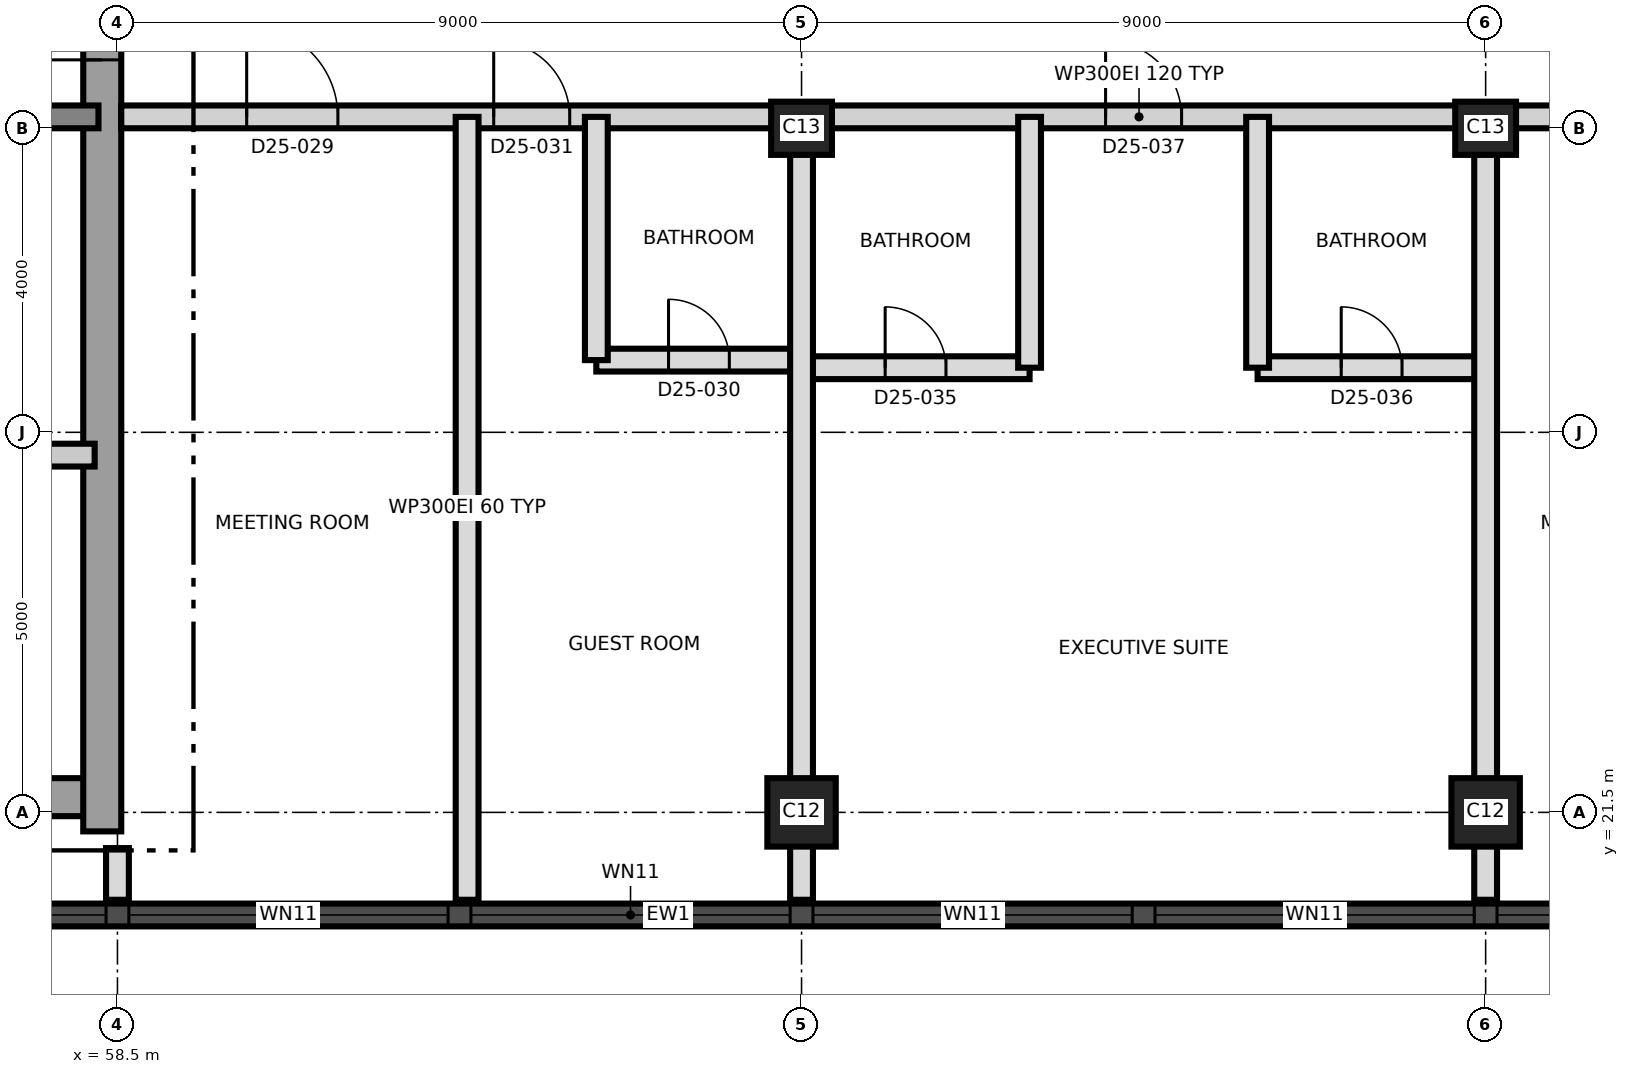
"""IFC4 building model, lengths in metres.
Left out: names, types, materials, properties, quantities, classifications, styles, units other than length and angle.
Written with IfcOpenShell. Run it as: python <this file> out.ifc"""

import sys

from ifc_helpers import new_model, si_unit, direction, frame, frame_2d, origin, origin_2d, place, context, subcontext, project, spatial, rectangle, extrude, element, fill, save


model = new_model("IFC4")
c1 = context("Model", 3, precision=1e-05, world=origin(), true_north=direction((0.0, 1.0)))
c2 = subcontext(c1, "Body", "Model", "MODEL_VIEW")
j1 = project(units=[si_unit("LENGTHUNIT", "METRE"), si_unit("PLANEANGLEUNIT", "RADIAN")], contexts=[c1])
p1 = place(None, origin())
s1 = spatial("IfcSite", under=j1, at=p1, CompositionType="ELEMENT")
p2 = place(p1, origin())
s2 = spatial("IfcBuilding", under=s1, at=p2, CompositionType="ELEMENT")
p3 = place(p2, frame((0.0, 0.0, 225.4)))
s3 = spatial("IfcBuildingStorey", under=s2, at=p3, CompositionType="ELEMENT", Elevation=225.4)
p4 = place(p3, frame((31.25, 21.7, 0.0), z_axis=(0.0, 0.0, 1.0), x_axis=(1.0, 0.0, 0.0)))
e1 = element("IfcWall", 1, at=p4, inside=s3, PredefinedType="SHEAR", context=c2, shape_type="SweptSolid", body=[
    extrude(rectangle(XDim=27.0, YDim=0.5, at=frame_2d((13.5, 0.0))), origin(), (0.0, 0.0, 1.0), 3.7),
])
p5 = place(p3, frame((58.3, 21.25, 0.0), z_axis=(0.0, 0.0, 1.0), x_axis=(0.0, 1.0, 0.0)))
e2 = element("IfcWall", 2, at=p5, inside=s3, PredefinedType="SHEAR", context=c2, shape_type="SweptSolid", body=[
    extrude(rectangle(XDim=18.5, YDim=0.5, at=frame_2d((9.25, 0.0))), origin(), (0.0, 0.0, 1.0), 3.7),
])
p6 = place(p5, frame((10.15, 0.0, 0.0)))
e3 = element("IfcOpeningElement", 3, at=p6, cuts=e2, PredefinedType="OPENING", context=c2, shape_type="SweptSolid", body=[
    extrude(rectangle(XDim=1.2, YDim=2.1, at=frame_2d((0.6, 1.05))), frame((0.0, 0.26, 0.0), z_axis=(0.0, -1.0, 0.0), x_axis=(1.0, 0.0, 0.0)), (0.0, 0.0, 1.0), 0.52),
])
p7 = place(p3, frame((31.75, 30.65, 0.0), z_axis=(0.0, 0.0, 1.0), x_axis=(1.0, 0.0, 0.0)))
e4 = element("IfcWall", 4, at=p7, inside=s3, PredefinedType="SHEAR", context=c2, shape_type="SweptSolid", body=[
    extrude(rectangle(XDim=26.5, YDim=0.3, at=frame_2d((13.25, 0.0))), origin(), (0.0, 0.0, 1.0), 3.7),
])
p8 = place(p7, frame((24.75, 0.0, 0.0)))
e5 = element("IfcOpeningElement", 5, at=p8, cuts=e4, PredefinedType="OPENING", context=c2, shape_type="SweptSolid", body=[
    extrude(rectangle(XDim=1.0, YDim=2.1, at=frame_2d((0.5, 1.05))), frame((0.0, 0.16, 0.0), z_axis=(0.0, -1.0, 0.0), x_axis=(1.0, 0.0, 0.0)), (0.0, 0.0, 1.0), 0.32),
])
p9 = place(p7, frame((4.05, 0.0, 0.0)))
e6 = element("IfcOpeningElement", 6, at=p9, cuts=e4, PredefinedType="OPENING", context=c2, shape_type="SweptSolid", body=[
    extrude(rectangle(XDim=1.0, YDim=2.1, at=frame_2d((0.5, 1.05))), frame((0.0, 0.16, 0.0), z_axis=(0.0, -1.0, 0.0), x_axis=(1.0, 0.0, 0.0)), (0.0, 0.0, 1.0), 0.32),
])
for number, where, z_axis, x_axis in (
    (7, (67.5, 21.5, 0.0), (0.0, 0.0, 1.0), (1.0, 0.0, 0.0)),
    (8, (76.5, 21.5, 0.0), (0.0, 0.0, 1.0), (1.0, 0.0, 0.0)),
):
    element("IfcColumn", number, at=place(p3, frame(where, z_axis=z_axis, x_axis=x_axis)), inside=s3, PredefinedType="COLUMN", context=c2, shape_type="SweptSolid", body=[
        extrude(rectangle(XDim=0.9, YDim=0.9, at=origin_2d()), origin(), (0.0, 0.0, 1.0), 3.7),
    ])
for number, where, z_axis, x_axis in (
    (9, (67.5, 30.5, 0.0), (0.0, 0.0, 1.0), (1.0, 0.0, 0.0)),
    (10, (76.5, 30.5, 0.0), (0.0, 0.0, 1.0), (1.0, 0.0, 0.0)),
):
    element("IfcColumn", number, at=place(p3, frame(where, z_axis=z_axis, x_axis=x_axis)), inside=s3, PredefinedType="COLUMN", context=c2, shape_type="SweptSolid", body=[
        extrude(rectangle(XDim=0.8, YDim=0.7, at=origin_2d()), origin(), (0.0, 0.0, 1.0), 3.7),
    ])
p10 = place(p3, frame((44.011, 20.15, 0.0), z_axis=(0.0, 0.0, 1.0), x_axis=(1.0, 0.0, 0.0)))
e11 = element("IfcWall", 11, at=p10, inside=s3, PredefinedType="SOLIDWALL", context=c2, shape_type="SweptSolid", body=[
    extrude(rectangle(XDim=43.476, YDim=0.3, at=frame_2d((21.738, 0.0))), origin(), (0.0, 0.0, 1.0), 3.4),
])
p11 = place(p10, frame((1.845, 0.0, 0.3)))
e12 = element("IfcOpeningElement", 12, at=p11, cuts=e11, PredefinedType="OPENING", context=c2, shape_type="SweptSolid", body=[
    extrude(rectangle(XDim=1.8, YDim=2.4, at=frame_2d((0.9, 1.2))), frame((0.0, 0.16, 0.0), z_axis=(0.0, -1.0, 0.0), x_axis=(1.0, 0.0, 0.0)), (0.0, 0.0, 1.0), 0.32),
])
p12 = place(p10, frame((5.639, 0.0, 0.9)))
e13 = element("IfcOpeningElement", 13, at=p12, cuts=e11, PredefinedType="OPENING", context=c2, shape_type="SweptSolid", body=[
    extrude(rectangle(XDim=4.2, YDim=1.5, at=frame_2d((2.1, 0.75))), frame((0.0, 0.16, 0.0), z_axis=(0.0, -1.0, 0.0), x_axis=(1.0, 0.0, 0.0)), (0.0, 0.0, 1.0), 0.32),
])
p13 = place(p10, frame((10.139, 0.0, 0.9)))
e14 = element("IfcOpeningElement", 14, at=p13, cuts=e11, PredefinedType="OPENING", context=c2, shape_type="SweptSolid", body=[
    extrude(rectangle(XDim=4.2, YDim=1.5, at=frame_2d((2.1, 0.75))), frame((0.0, 0.16, 0.0), z_axis=(0.0, -1.0, 0.0), x_axis=(1.0, 0.0, 0.0)), (0.0, 0.0, 1.0), 0.32),
])
p14 = place(p10, frame((14.639, 0.0, 0.9)))
e15 = element("IfcOpeningElement", 15, at=p14, cuts=e11, PredefinedType="OPENING", context=c2, shape_type="SweptSolid", body=[
    extrude(rectangle(XDim=4.2, YDim=1.5, at=frame_2d((2.1, 0.75))), frame((0.0, 0.16, 0.0), z_axis=(0.0, -1.0, 0.0), x_axis=(1.0, 0.0, 0.0)), (0.0, 0.0, 1.0), 0.32),
])
p15 = place(p10, frame((19.139, 0.0, 0.9)))
e16 = element("IfcOpeningElement", 16, at=p15, cuts=e11, PredefinedType="OPENING", context=c2, shape_type="SweptSolid", body=[
    extrude(rectangle(XDim=4.2, YDim=1.5, at=frame_2d((2.1, 0.75))), frame((0.0, 0.16, 0.0), z_axis=(0.0, -1.0, 0.0), x_axis=(1.0, 0.0, 0.0)), (0.0, 0.0, 1.0), 0.32),
])
p16 = place(p10, frame((23.639, 0.0, 0.9)))
e17 = element("IfcOpeningElement", 17, at=p16, cuts=e11, PredefinedType="OPENING", context=c2, shape_type="SweptSolid", body=[
    extrude(rectangle(XDim=4.2, YDim=1.5, at=frame_2d((2.1, 0.75))), frame((0.0, 0.16, 0.0), z_axis=(0.0, -1.0, 0.0), x_axis=(1.0, 0.0, 0.0)), (0.0, 0.0, 1.0), 0.32),
])
p17 = place(p10, frame((28.139, 0.0, 0.9)))
e18 = element("IfcOpeningElement", 18, at=p17, cuts=e11, PredefinedType="OPENING", context=c2, shape_type="SweptSolid", body=[
    extrude(rectangle(XDim=4.2, YDim=1.5, at=frame_2d((2.1, 0.75))), frame((0.0, 0.16, 0.0), z_axis=(0.0, -1.0, 0.0), x_axis=(1.0, 0.0, 0.0)), (0.0, 0.0, 1.0), 0.32),
])
p18 = place(p10, frame((32.639, 0.0, 0.9)))
e19 = element("IfcOpeningElement", 19, at=p18, cuts=e11, PredefinedType="OPENING", context=c2, shape_type="SweptSolid", body=[
    extrude(rectangle(XDim=4.2, YDim=1.5, at=frame_2d((2.1, 0.75))), frame((0.0, 0.16, 0.0), z_axis=(0.0, -1.0, 0.0), x_axis=(1.0, 0.0, 0.0)), (0.0, 0.0, 1.0), 0.32),
])
p19 = place(p10, frame((37.139, 0.0, 0.9)))
e20 = element("IfcOpeningElement", 20, at=p19, cuts=e11, PredefinedType="OPENING", context=c2, shape_type="SweptSolid", body=[
    extrude(rectangle(XDim=4.2, YDim=1.5, at=frame_2d((2.1, 0.75))), frame((0.0, 0.16, 0.0), z_axis=(0.0, -1.0, 0.0), x_axis=(1.0, 0.0, 0.0)), (0.0, 0.0, 1.0), 0.32),
])
p20 = place(p3, frame((55.8, 26.2, 0.0), z_axis=(0.0, 0.0, 1.0), x_axis=(1.0, 0.0, 0.0)))
e21 = element("IfcWall", 21, at=p20, inside=s3, PredefinedType="PARTITIONING", context=c2, shape_type="SweptSolid", body=[
    extrude(rectangle(XDim=2.4, YDim=0.3, at=frame_2d((1.2, 0.0))), origin(), (0.0, 0.0, 1.0), 3.4),
])
p21 = place(p20, frame((0.75, 0.0, 0.0)))
e22 = element("IfcOpeningElement", 22, at=p21, cuts=e21, PredefinedType="OPENING", context=c2, shape_type="SweptSolid", body=[
    extrude(rectangle(XDim=0.9, YDim=2.1, at=frame_2d((0.45, 1.05))), frame((0.0, 0.16, 0.0), z_axis=(0.0, -1.0, 0.0), x_axis=(1.0, 0.0, 0.0)), (0.0, 0.0, 1.0), 0.32),
])
p22 = place(p3, frame((67.5, 27.35, 0.0), z_axis=(0.0, 0.0, 1.0), x_axis=(1.0, 0.0, 0.0)))
e23 = element("IfcWall", 23, at=p22, inside=s3, PredefinedType="PARTITIONING", context=c2, shape_type="SweptSolid", body=[
    extrude(rectangle(XDim=3.0, YDim=0.3, at=frame_2d((1.5, 0.0))), origin(), (0.0, 0.0, 1.0), 3.4),
])
p23 = place(p22, frame((1.1, 0.0, 0.0)))
e24 = element("IfcOpeningElement", 24, at=p23, cuts=e23, PredefinedType="OPENING", context=c2, shape_type="SweptSolid", body=[
    extrude(rectangle(XDim=0.8, YDim=2.1, at=frame_2d((0.4, 1.05))), frame((0.0, 0.16, 0.0), z_axis=(0.0, -1.0, 0.0), x_axis=(1.0, 0.0, 0.0)), (0.0, 0.0, 1.0), 0.32),
])
p24 = place(p3, frame((73.5, 27.35, 0.0), z_axis=(0.0, 0.0, 1.0), x_axis=(1.0, 0.0, 0.0)))
e25 = element("IfcWall", 25, at=p24, inside=s3, PredefinedType="PARTITIONING", context=c2, shape_type="SweptSolid", body=[
    extrude(rectangle(XDim=3.0, YDim=0.3, at=frame_2d((1.5, 0.0))), origin(), (0.0, 0.0, 1.0), 3.4),
])
p25 = place(p24, frame((1.1, 0.0, 0.0)))
e26 = element("IfcOpeningElement", 26, at=p25, cuts=e25, PredefinedType="OPENING", context=c2, shape_type="SweptSolid", body=[
    extrude(rectangle(XDim=0.8, YDim=2.1, at=frame_2d((0.4, 1.05))), frame((0.0, 0.16, 0.0), z_axis=(0.0, -1.0, 0.0), x_axis=(1.0, 0.0, 0.0)), (0.0, 0.0, 1.0), 0.32),
])
p26 = place(p3, frame((64.8, 27.45, 0.0), z_axis=(0.0, 0.0, 1.0), x_axis=(1.0, 0.0, 0.0)))
e27 = element("IfcWall", 27, at=p26, inside=s3, PredefinedType="PARTITIONING", context=c2, shape_type="SweptSolid", body=[
    extrude(rectangle(XDim=2.7, YDim=0.3, at=frame_2d((1.35, 0.0))), origin(), (0.0, 0.0, 1.0), 3.4),
])
p27 = place(p26, frame((0.95, 0.0, 0.0)))
e28 = element("IfcOpeningElement", 28, at=p27, cuts=e27, PredefinedType="OPENING", context=c2, shape_type="SweptSolid", body=[
    extrude(rectangle(XDim=0.8, YDim=2.1, at=frame_2d((0.4, 1.05))), frame((0.0, 0.16, 0.0), z_axis=(0.0, -1.0, 0.0), x_axis=(1.0, 0.0, 0.0)), (0.0, 0.0, 1.0), 0.32),
])
p28 = place(p3, frame((58.55, 30.65, 0.0), z_axis=(0.0, 0.0, 1.0), x_axis=(1.0, 0.0, 0.0)))
e29 = element("IfcWall", 29, at=p28, inside=s3, PredefinedType="PARTITIONING", context=c2, shape_type="SweptSolid", body=[
    extrude(rectangle(XDim=26.78, YDim=0.3, at=frame_2d((13.39, 0.0))), origin(), (0.0, 0.0, 1.0), 3.4),
])
p29 = place(p28, frame((1.65, 0.0, 0.0)))
e30 = element("IfcOpeningElement", 30, at=p29, cuts=e29, PredefinedType="OPENING", context=c2, shape_type="SweptSolid", body=[
    extrude(rectangle(XDim=1.2, YDim=2.1, at=frame_2d((0.6, 1.05))), frame((0.0, 0.16, 0.0), z_axis=(0.0, -1.0, 0.0), x_axis=(1.0, 0.0, 0.0)), (0.0, 0.0, 1.0), 0.32),
])
p30 = place(p28, frame((4.9, 0.0, 0.0)))
e31 = element("IfcOpeningElement", 31, at=p30, cuts=e29, PredefinedType="OPENING", context=c2, shape_type="SweptSolid", body=[
    extrude(rectangle(XDim=1.0, YDim=2.1, at=frame_2d((0.5, 1.05))), frame((0.0, 0.16, 0.0), z_axis=(0.0, -1.0, 0.0), x_axis=(1.0, 0.0, 0.0)), (0.0, 0.0, 1.0), 0.32),
])
p31 = place(p28, frame((12.95, 0.0, 0.0)))
e32 = element("IfcOpeningElement", 32, at=p31, cuts=e29, PredefinedType="OPENING", context=c2, shape_type="SweptSolid", body=[
    extrude(rectangle(XDim=1.0, YDim=2.4, at=frame_2d((0.5, 1.2))), frame((0.0, 0.16, 0.0), z_axis=(0.0, -1.0, 0.0), x_axis=(1.0, 0.0, 0.0)), (0.0, 0.0, 1.0), 0.32),
])
p32 = place(p28, frame((19.085, 0.0, 0.0)))
e33 = element("IfcOpeningElement", 33, at=p32, cuts=e29, PredefinedType="OPENING", context=c2, shape_type="SweptSolid", body=[
    extrude(rectangle(XDim=1.2, YDim=2.1, at=frame_2d((0.6, 1.05))), frame((0.0, 0.16, 0.0), z_axis=(0.0, -1.0, 0.0), x_axis=(1.0, 0.0, 0.0)), (0.0, 0.0, 1.0), 0.32),
])
p33 = place(p28, frame((22.335, 0.0, 0.0)))
e34 = element("IfcOpeningElement", 34, at=p33, cuts=e29, PredefinedType="OPENING", context=c2, shape_type="SweptSolid", body=[
    extrude(rectangle(XDim=1.0, YDim=2.1, at=frame_2d((0.5, 1.05))), frame((0.0, 0.16, 0.0), z_axis=(0.0, -1.0, 0.0), x_axis=(1.0, 0.0, 0.0)), (0.0, 0.0, 1.0), 0.32),
])
p34 = place(p3, frame((58.5, 20.35, 0.0), z_axis=(0.0, 0.0, 1.0), x_axis=(0.0, 1.0, 0.0)))
e35 = element("IfcWall", 35, at=p34, inside=s3, PredefinedType="PARTITIONING", context=c2, shape_type="SweptSolid", body=[
    extrude(rectangle(XDim=0.68, YDim=0.3, at=frame_2d((0.34, 0.0))), origin(), (0.0, 0.0, 1.0), 3.4),
])
p35 = place(p3, frame((63.1, 20.35, 0.0), z_axis=(0.0, 0.0, 1.0), x_axis=(0.0, 1.0, 0.0)))
e36 = element("IfcWall", 36, at=p35, inside=s3, PredefinedType="PARTITIONING", context=c2, shape_type="SweptSolid", body=[
    extrude(rectangle(XDim=10.3, YDim=0.3, at=frame_2d((5.15, 0.0))), origin(), (0.0, 0.0, 1.0), 3.4),
])
p36 = place(p3, frame((64.8, 27.45, 0.0), z_axis=(0.0, 0.0, 1.0), x_axis=(0.0, 1.0, 0.0)))
e37 = element("IfcWall", 37, at=p36, inside=s3, PredefinedType="PARTITIONING", context=c2, shape_type="SweptSolid", body=[
    extrude(rectangle(XDim=3.2, YDim=0.3, at=frame_2d((1.6, 0.0))), origin(), (0.0, 0.0, 1.0), 3.4),
])
p37 = place(p3, frame((67.5, 20.35, 0.0), z_axis=(0.0, 0.0, 1.0), x_axis=(0.0, 1.0, 0.0)))
e38 = element("IfcWall", 38, at=p37, inside=s3, PredefinedType="PARTITIONING", context=c2, shape_type="SweptSolid", body=[
    extrude(rectangle(XDim=10.3, YDim=0.3, at=frame_2d((5.15, 0.0))), origin(), (0.0, 0.0, 1.0), 3.4),
])
for number, where, z_axis, x_axis in (
    (39, (70.5, 27.35, 0.0), (0.0, 0.0, 1.0), (0.0, 1.0, 0.0)),
    (40, (73.5, 27.35, 0.0), (0.0, 0.0, 1.0), (0.0, 1.0, 0.0)),
):
    element("IfcWall", number, at=place(p3, frame(where, z_axis=z_axis, x_axis=x_axis)), inside=s3, PredefinedType="PARTITIONING", context=c2, shape_type="SweptSolid", body=[
        extrude(rectangle(XDim=3.3, YDim=0.3, at=frame_2d((1.65, 0.0))), origin(), (0.0, 0.0, 1.0), 3.4),
    ])
p38 = place(p3, frame((76.5, 20.35, 0.0), z_axis=(0.0, 0.0, 1.0), x_axis=(0.0, 1.0, 0.0)))
e41 = element("IfcWall", 41, at=p38, inside=s3, PredefinedType="PARTITIONING", context=c2, shape_type="SweptSolid", body=[
    extrude(rectangle(XDim=10.3, YDim=0.3, at=frame_2d((5.15, 0.0))), origin(), (0.0, 0.0, 1.0), 3.4),
])
p39 = place(p13, origin())
e42 = element("IfcWindow", 42, at=p39, inside=s3, PartitioningType="SINGLE_PANEL", PredefinedType="WINDOW", context=c2, shape_type="SweptSolid", body=[
    extrude(rectangle(XDim=4.2, YDim=1.5, at=frame_2d((2.1, 0.75))), frame((0.0, 0.03, 0.0), z_axis=(0.0, -1.0, 0.0), x_axis=(1.0, 0.0, 0.0)), (0.0, 0.0, 1.0), 0.06),
])
fill(e14, e42)
p40 = place(p14, origin())
e43 = element("IfcWindow", 43, at=p40, inside=s3, PartitioningType="SINGLE_PANEL", PredefinedType="WINDOW", context=c2, shape_type="SweptSolid", body=[
    extrude(rectangle(XDim=4.2, YDim=1.5, at=frame_2d((2.1, 0.75))), frame((0.0, 0.03, 0.0), z_axis=(0.0, -1.0, 0.0), x_axis=(1.0, 0.0, 0.0)), (0.0, 0.0, 1.0), 0.06),
])
fill(e15, e43)
p41 = place(p15, origin())
e44 = element("IfcWindow", 44, at=p41, inside=s3, PartitioningType="SINGLE_PANEL", PredefinedType="WINDOW", context=c2, shape_type="SweptSolid", body=[
    extrude(rectangle(XDim=4.2, YDim=1.5, at=frame_2d((2.1, 0.75))), frame((0.0, 0.03, 0.0), z_axis=(0.0, -1.0, 0.0), x_axis=(1.0, 0.0, 0.0)), (0.0, 0.0, 1.0), 0.06),
])
fill(e16, e44)
p42 = place(p16, origin())
e45 = element("IfcWindow", 45, at=p42, inside=s3, PartitioningType="SINGLE_PANEL", PredefinedType="WINDOW", context=c2, shape_type="SweptSolid", body=[
    extrude(rectangle(XDim=4.2, YDim=1.5, at=frame_2d((2.1, 0.75))), frame((0.0, 0.03, 0.0), z_axis=(0.0, -1.0, 0.0), x_axis=(1.0, 0.0, 0.0)), (0.0, 0.0, 1.0), 0.06),
])
fill(e17, e45)
p43 = place(p17, origin())
e46 = element("IfcWindow", 46, at=p43, inside=s3, PartitioningType="SINGLE_PANEL", PredefinedType="WINDOW", context=c2, shape_type="SweptSolid", body=[
    extrude(rectangle(XDim=4.2, YDim=1.5, at=frame_2d((2.1, 0.75))), frame((0.0, 0.03, 0.0), z_axis=(0.0, -1.0, 0.0), x_axis=(1.0, 0.0, 0.0)), (0.0, 0.0, 1.0), 0.06),
])
fill(e18, e46)
p44 = place(p18, origin())
e47 = element("IfcWindow", 47, at=p44, inside=s3, PartitioningType="SINGLE_PANEL", PredefinedType="WINDOW", context=c2, shape_type="SweptSolid", body=[
    extrude(rectangle(XDim=4.2, YDim=1.5, at=frame_2d((2.1, 0.75))), frame((0.0, 0.03, 0.0), z_axis=(0.0, -1.0, 0.0), x_axis=(1.0, 0.0, 0.0)), (0.0, 0.0, 1.0), 0.06),
])
fill(e19, e47)
p45 = place(p6, origin())
e48 = element("IfcDoor", 48, at=p45, inside=s3, OperationType="SINGLE_SWING_LEFT", PredefinedType="DOOR", context=c2, shape_type="SweptSolid", body=[
    extrude(rectangle(XDim=1.2, YDim=2.1, at=frame_2d((0.6, 1.05))), frame((0.0, 0.025, 0.0), z_axis=(0.0, -1.0, 0.0), x_axis=(1.0, 0.0, 0.0)), (0.0, 0.0, 1.0), 0.05),
])
fill(e3, e48)
p46 = place(p29, origin())
e49 = element("IfcDoor", 49, at=p46, inside=s3, OperationType="SINGLE_SWING_LEFT", PredefinedType="DOOR", context=c2, shape_type="SweptSolid", body=[
    extrude(rectangle(XDim=1.2, YDim=2.1, at=frame_2d((0.6, 1.05))), frame((0.0, 0.025, 0.0), z_axis=(0.0, -1.0, 0.0), x_axis=(1.0, 0.0, 0.0)), (0.0, 0.0, 1.0), 0.05),
])
fill(e30, e49)
p47 = place(p27, origin())
e50 = element("IfcDoor", 50, at=p47, inside=s3, OperationType="SINGLE_SWING_RIGHT", PredefinedType="DOOR", context=c2, shape_type="SweptSolid", body=[
    extrude(rectangle(XDim=0.8, YDim=2.1, at=frame_2d((0.4, 1.05))), frame((0.0, 0.025, 0.0), z_axis=(0.0, -1.0, 0.0), x_axis=(1.0, 0.0, 0.0)), (0.0, 0.0, 1.0), 0.05),
])
fill(e28, e50)
p48 = place(p30, origin())
e51 = element("IfcDoor", 51, at=p48, inside=s3, OperationType="SINGLE_SWING_LEFT", PredefinedType="DOOR", context=c2, shape_type="SweptSolid", body=[
    extrude(rectangle(XDim=1.0, YDim=2.1, at=frame_2d((0.5, 1.05))), frame((0.0, 0.025, 0.0), z_axis=(0.0, -1.0, 0.0), x_axis=(1.0, 0.0, 0.0)), (0.0, 0.0, 1.0), 0.05),
])
fill(e31, e51)
p49 = place(p23, origin())
e52 = element("IfcDoor", 52, at=p49, inside=s3, OperationType="SINGLE_SWING_LEFT", PredefinedType="DOOR", context=c2, shape_type="SweptSolid", body=[
    extrude(rectangle(XDim=0.8, YDim=2.1, at=frame_2d((0.4, 1.05))), frame((0.0, 0.025, 0.0), z_axis=(0.0, -1.0, 0.0), x_axis=(1.0, 0.0, 0.0)), (0.0, 0.0, 1.0), 0.05),
])
fill(e24, e52)
p50 = place(p25, origin())
e53 = element("IfcDoor", 53, at=p50, inside=s3, OperationType="SINGLE_SWING_RIGHT", PredefinedType="DOOR", context=c2, shape_type="SweptSolid", body=[
    extrude(rectangle(XDim=0.8, YDim=2.1, at=frame_2d((0.4, 1.05))), frame((0.0, 0.025, 0.0), z_axis=(0.0, -1.0, 0.0), x_axis=(1.0, 0.0, 0.0)), (0.0, 0.0, 1.0), 0.05),
])
fill(e26, e53)
p51 = place(p31, origin())
e54 = element("IfcDoor", 54, at=p51, inside=s3, OperationType="SINGLE_SWING_LEFT", PredefinedType="DOOR", context=c2, shape_type="SweptSolid", body=[
    extrude(rectangle(XDim=1.0, YDim=2.4, at=frame_2d((0.5, 1.2))), frame((0.0, 0.025, 0.0), z_axis=(0.0, -1.0, 0.0), x_axis=(1.0, 0.0, 0.0)), (0.0, 0.0, 1.0), 0.05),
])
fill(e32, e54)
save(model, sys.argv[1])
